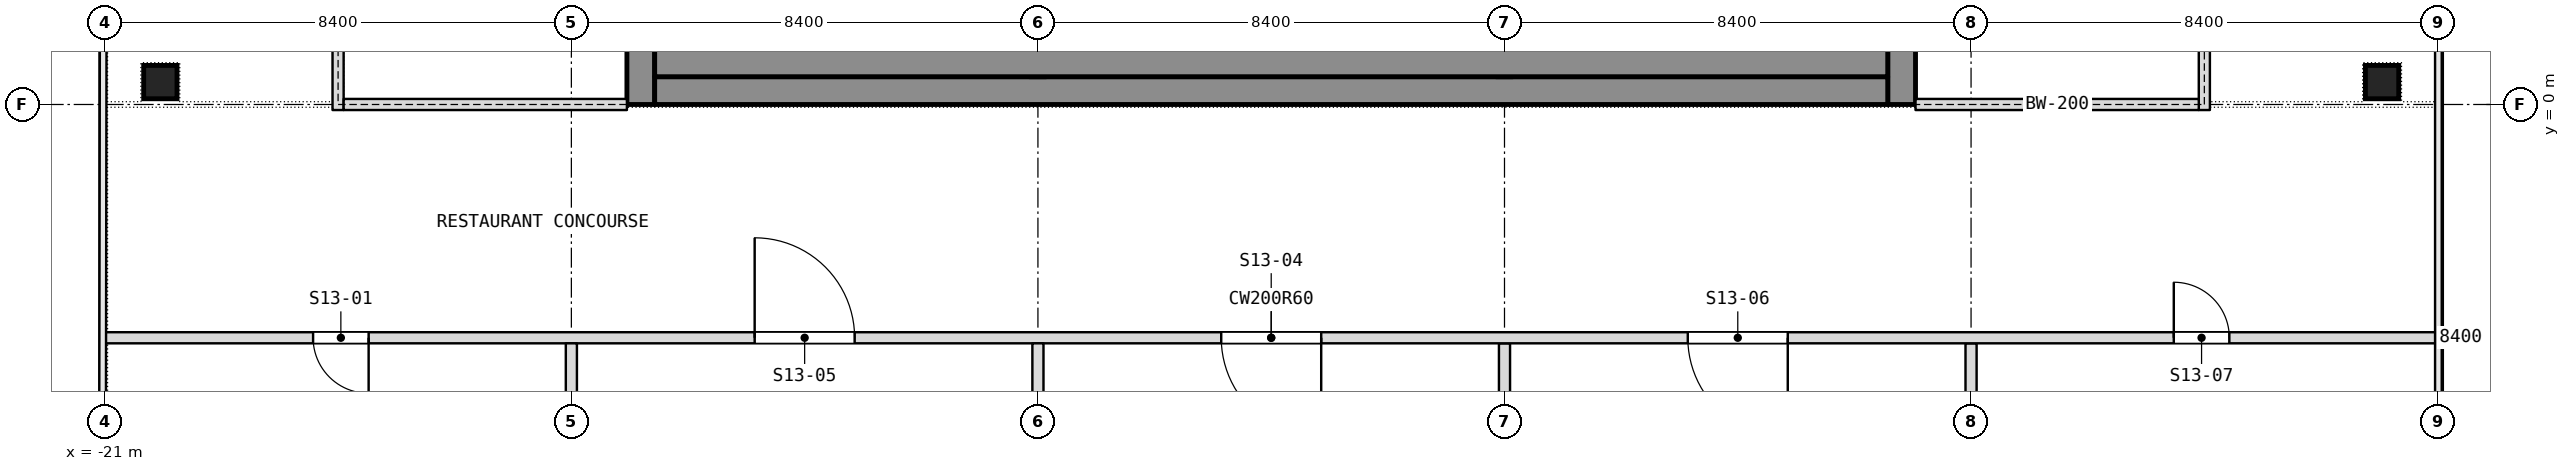
"""IFC4 building model, lengths in metres.
Left out: names, types, materials, properties, quantities, classifications, styles, units other than length and angle.
Written with IfcOpenShell. Run it as: python <this file> out.ifc"""

import sys

from ifc_helpers import new_model, si_unit, direction, frame, frame_2d, origin, origin_2d, place, context, subcontext, project, spatial, rectangle, extrude, element, fill, save


model = new_model("IFC4")
c1 = context("Model", 3, precision=1e-05, world=origin(), true_north=direction((0.0, 1.0)))
c2 = subcontext(c1, "Body", "Model", "MODEL_VIEW")
j1 = project(units=[si_unit("LENGTHUNIT", "METRE"), si_unit("PLANEANGLEUNIT", "RADIAN")], contexts=[c1])
p1 = place(None, origin())
s1 = spatial("IfcSite", under=j1, at=p1, CompositionType="ELEMENT")
p2 = place(p1, origin())
s2 = spatial("IfcBuilding", under=s1, at=p2, CompositionType="ELEMENT")
p3 = place(p2, frame((0.0, 0.0, 288.5)))
s3 = spatial("IfcBuildingStorey", under=s2, at=p3, CompositionType="ELEMENT", Elevation=288.5)
p4 = place(p3, frame((11.35, 0.0, 0.0), z_axis=(0.0, 0.0, 1.0), x_axis=(0.0, 1.0, 0.0)))
e1 = element("IfcWall", 1, at=p4, inside=s3, PredefinedType="SHEAR", context=c2, shape_type="SweptSolid", body=[
    extrude(rectangle(XDim=16.8, YDim=0.5, at=frame_2d((8.4, 0.0))), origin(), (0.0, 0.0, 1.0), 7.2),
])
p5 = place(p4, frame((1.688, 0.0, 0.0)))
e2 = element("IfcOpeningElement", 2, at=p5, cuts=e1, PredefinedType="OPENING", context=c2, shape_type="SweptSolid", body=[
    extrude(rectangle(XDim=0.9, YDim=2.1, at=frame_2d((0.45, 1.05))), frame((0.0, 0.25, 0.0), z_axis=(0.0, -1.0, 0.0), x_axis=(1.0, 0.0, 0.0)), (0.0, 0.0, 1.0), 0.5),
])
p6 = place(p4, frame((4.312, 0.0, 0.0)))
e3 = element("IfcOpeningElement", 3, at=p6, cuts=e1, PredefinedType="OPENING", context=c2, shape_type="SweptSolid", body=[
    extrude(rectangle(XDim=0.9, YDim=2.1, at=frame_2d((0.45, 1.05))), frame((0.0, 0.25, 0.0), z_axis=(0.0, -1.0, 0.0), x_axis=(1.0, 0.0, 0.0)), (0.0, 0.0, 1.0), 0.5),
])
p7 = place(p4, frame((6.825, 0.0, 0.0)))
e4 = element("IfcOpeningElement", 4, at=p7, cuts=e1, PredefinedType="OPENING", context=c2, shape_type="SweptSolid", body=[
    extrude(rectangle(XDim=1.2, YDim=2.1, at=frame_2d((0.6, 1.05))), frame((0.0, 0.25, 0.0), z_axis=(0.0, -1.0, 0.0), x_axis=(1.0, 0.0, 0.0)), (0.0, 0.0, 1.0), 0.5),
])
p8 = place(p4, frame((14.212, 0.0, 0.0)))
e5 = element("IfcOpeningElement", 5, at=p8, cuts=e1, PredefinedType="OPENING", context=c2, shape_type="SweptSolid", body=[
    extrude(rectangle(XDim=0.9, YDim=2.1, at=frame_2d((0.45, 1.05))), frame((0.0, 0.25, 0.0), z_axis=(0.0, -1.0, 0.0), x_axis=(1.0, 0.0, 0.0)), (0.0, 0.0, 1.0), 0.5),
])
p9 = place(p4, frame((11.587, 0.0, 0.0)))
e6 = element("IfcOpeningElement", 6, at=p9, cuts=e1, PredefinedType="OPENING", context=c2, shape_type="SweptSolid", body=[
    extrude(rectangle(XDim=0.9, YDim=2.1, at=frame_2d((0.45, 1.05))), frame((0.0, 0.25, 0.0), z_axis=(0.0, -1.0, 0.0), x_axis=(1.0, 0.0, 0.0)), (0.0, 0.0, 1.0), 0.5),
])
p10 = place(p4, frame((8.775, 0.0, 0.0)))
e7 = element("IfcOpeningElement", 7, at=p10, cuts=e1, PredefinedType="OPENING", context=c2, shape_type="SweptSolid", body=[
    extrude(rectangle(XDim=1.2, YDim=2.1, at=frame_2d((0.6, 1.05))), frame((0.0, 0.25, 0.0), z_axis=(0.0, -1.0, 0.0), x_axis=(1.0, 0.0, 0.0)), (0.0, 0.0, 1.0), 0.5),
])
p11 = place(p3, frame((-11.35, 0.0, 0.0), z_axis=(0.0, 0.0, 1.0), x_axis=(0.0, 1.0, 0.0)))
e8 = element("IfcWall", 8, at=p11, inside=s3, PredefinedType="SHEAR", context=c2, shape_type="SweptSolid", body=[
    extrude(rectangle(XDim=16.8, YDim=0.5, at=frame_2d((8.4, 0.0))), origin(), (0.0, 0.0, 1.0), 7.2),
])
p12 = place(p11, frame((3.6, 0.0, 0.0)))
e9 = element("IfcOpeningElement", 9, at=p12, cuts=e8, PredefinedType="OPENING", context=c2, shape_type="SweptSolid", body=[
    extrude(rectangle(XDim=0.9, YDim=2.1, at=frame_2d((0.45, 1.05))), frame((0.0, 0.25, 0.0), z_axis=(0.0, -1.0, 0.0), x_axis=(1.0, 0.0, 0.0)), (0.0, 0.0, 1.0), 0.5),
])
p13 = place(p11, frame((6.825, 0.0, 0.0)))
e10 = element("IfcOpeningElement", 10, at=p13, cuts=e8, PredefinedType="OPENING", context=c2, shape_type="SweptSolid", body=[
    extrude(rectangle(XDim=1.2, YDim=2.1, at=frame_2d((0.6, 1.05))), frame((0.0, 0.25, 0.0), z_axis=(0.0, -1.0, 0.0), x_axis=(1.0, 0.0, 0.0)), (0.0, 0.0, 1.0), 0.5),
])
p14 = place(p11, frame((14.212, 0.0, 0.0)))
e11 = element("IfcOpeningElement", 11, at=p14, cuts=e8, PredefinedType="OPENING", context=c2, shape_type="SweptSolid", body=[
    extrude(rectangle(XDim=0.9, YDim=2.1, at=frame_2d((0.45, 1.05))), frame((0.0, 0.25, 0.0), z_axis=(0.0, -1.0, 0.0), x_axis=(1.0, 0.0, 0.0)), (0.0, 0.0, 1.0), 0.5),
])
p15 = place(p11, frame((11.587, 0.0, 0.0)))
e12 = element("IfcOpeningElement", 12, at=p15, cuts=e8, PredefinedType="OPENING", context=c2, shape_type="SweptSolid", body=[
    extrude(rectangle(XDim=0.9, YDim=2.1, at=frame_2d((0.45, 1.05))), frame((0.0, 0.25, 0.0), z_axis=(0.0, -1.0, 0.0), x_axis=(1.0, 0.0, 0.0)), (0.0, 0.0, 1.0), 0.5),
])
p16 = place(p11, frame((8.775, 0.0, 0.0)))
e13 = element("IfcOpeningElement", 13, at=p16, cuts=e8, PredefinedType="OPENING", context=c2, shape_type="SweptSolid", body=[
    extrude(rectangle(XDim=1.2, YDim=2.1, at=frame_2d((0.6, 1.05))), frame((0.0, 0.25, 0.0), z_axis=(0.0, -1.0, 0.0), x_axis=(1.0, 0.0, 0.0)), (0.0, 0.0, 1.0), 0.5),
])
p17 = place(p3, frame((-11.1, 0.25, 0.0), z_axis=(0.0, 0.0, 1.0), x_axis=(1.0, 0.0, 0.0)))
e14 = element("IfcWall", 14, at=p17, inside=s3, PredefinedType="SHEAR", context=c2, shape_type="SweptSolid", body=[
    extrude(rectangle(XDim=22.2, YDim=0.5, at=frame_2d((11.1, 0.0))), origin(), (0.0, 0.0, 1.0), 7.2),
])
p18 = place(p3, frame((-4.2, 0.5, 0.0), z_axis=(0.0, 0.0, 1.0), x_axis=(0.0, 1.0, 0.0)))
e15 = element("IfcWall", 15, at=p18, inside=s3, PredefinedType="SHEAR", context=c2, shape_type="SweptSolid", body=[
    extrude(rectangle(XDim=15.8, YDim=0.3, at=frame_2d((7.9, 0.0))), origin(), (0.0, 0.0, 1.0), 7.2),
])
p19 = place(p18, frame((8.8, 0.0, 0.0)))
e16 = element("IfcOpeningElement", 16, at=p19, cuts=e15, PredefinedType="OPENING", context=c2, shape_type="SweptSolid", body=[
    extrude(rectangle(XDim=1.2, YDim=2.1, at=frame_2d((0.6, 1.05))), frame((0.0, 0.15, 0.0), z_axis=(0.0, -1.0, 0.0), x_axis=(1.0, 0.0, 0.0)), (0.0, 0.0, 1.0), 0.3),
])
p20 = place(p3, frame((4.2, 0.5, 0.0), z_axis=(0.0, 0.0, 1.0), x_axis=(0.0, 1.0, 0.0)))
e17 = element("IfcWall", 17, at=p20, inside=s3, PredefinedType="SHEAR", context=c2, shape_type="SweptSolid", body=[
    extrude(rectangle(XDim=15.8, YDim=0.3, at=frame_2d((7.9, 0.0))), origin(), (0.0, 0.0, 1.0), 7.2),
])
p21 = place(p20, frame((6.25, 0.0, 0.0)))
e18 = element("IfcOpeningElement", 18, at=p21, cuts=e17, PredefinedType="OPENING", context=c2, shape_type="SweptSolid", body=[
    extrude(rectangle(XDim=1.2, YDim=2.1, at=frame_2d((0.6, 1.05))), frame((0.0, 0.15, 0.0), z_axis=(0.0, -1.0, 0.0), x_axis=(1.0, 0.0, 0.0)), (0.0, 0.0, 1.0), 0.3),
])
for number, where, z_axis, x_axis in (
    (19, (-20.0, 0.403, 0.0), (0.0, 0.0, 1.0), (1.0, 0.0, 0.0)),
    (20, (20.0, 0.403, 0.0), (0.0, 0.0, 1.0), (1.0, 0.0, 0.0)),
):
    element("IfcColumn", number, at=place(p3, frame(where, z_axis=z_axis, x_axis=x_axis)), inside=s3, PredefinedType="COLUMN", context=c2, shape_type="SweptSolid", body=[
        extrude(rectangle(XDim=0.6, YDim=0.6, at=origin_2d()), origin(), (0.0, 0.0, 1.0), 6.9),
    ])
p22 = place(p3, frame((12.6, -17.5, 0.0), z_axis=(0.0, 0.0, 1.0), x_axis=(0.0, 1.0, 0.0)))
e21 = element("IfcWall", 21, at=p22, inside=s3, PredefinedType="PARTITIONING", context=c2, shape_type="SweptSolid", body=[
    extrude(rectangle(XDim=13.2, YDim=0.2, at=frame_2d((6.6, 0.0))), origin(), (0.0, 0.0, 1.0), 6.9),
])
p23 = place(p3, frame((4.2, -32.9, 0.0), z_axis=(0.0, 0.0, 1.0), x_axis=(0.0, 1.0, 0.0)))
e22 = element("IfcWall", 22, at=p23, inside=s3, PredefinedType="PARTITIONING", context=c2, shape_type="SweptSolid", body=[
    extrude(rectangle(XDim=28.6, YDim=0.2, at=frame_2d((14.3, 0.0))), origin(), (0.0, 0.0, 1.0), 6.9),
])
p24 = place(p3, frame((-21.0, -4.2, 0.0), z_axis=(0.0, 0.0, 1.0), x_axis=(1.0, 0.0, 0.0)))
e23 = element("IfcWall", 23, at=p24, inside=s3, PredefinedType="PARTITIONING", context=c2, shape_type="SweptSolid", body=[
    extrude(rectangle(XDim=42.0, YDim=0.2, at=frame_2d((21.0, 0.0))), origin(), (0.0, 0.0, 1.0), 6.9),
])
p25 = place(p24, frame((3.75, 0.0, 0.0)))
e24 = element("IfcOpeningElement", 24, at=p25, cuts=e23, PredefinedType="OPENING", context=c2, shape_type="SweptSolid", body=[
    extrude(rectangle(XDim=1.0, YDim=2.1, at=frame_2d((0.5, 1.05))), frame((0.0, 0.1, 0.0), z_axis=(0.0, -1.0, 0.0), x_axis=(1.0, 0.0, 0.0)), (0.0, 0.0, 1.0), 0.2),
])
p26 = place(p24, frame((20.1, 0.0, 0.0)))
e25 = element("IfcOpeningElement", 25, at=p26, cuts=e23, PredefinedType="OPENING", context=c2, shape_type="SweptSolid", body=[
    extrude(rectangle(XDim=1.8, YDim=2.1, at=frame_2d((0.9, 1.05))), frame((0.0, 0.1, 0.0), z_axis=(0.0, -1.0, 0.0), x_axis=(1.0, 0.0, 0.0)), (0.0, 0.0, 1.0), 0.2),
])
p27 = place(p24, frame((11.7, 0.0, 0.0)))
e26 = element("IfcOpeningElement", 26, at=p27, cuts=e23, PredefinedType="OPENING", context=c2, shape_type="SweptSolid", body=[
    extrude(rectangle(XDim=1.8, YDim=2.1, at=frame_2d((0.9, 1.05))), frame((0.0, 0.1, 0.0), z_axis=(0.0, -1.0, 0.0), x_axis=(1.0, 0.0, 0.0)), (0.0, 0.0, 1.0), 0.2),
])
p28 = place(p24, frame((28.5, 0.0, 0.0)))
e27 = element("IfcOpeningElement", 27, at=p28, cuts=e23, PredefinedType="OPENING", context=c2, shape_type="SweptSolid", body=[
    extrude(rectangle(XDim=1.8, YDim=2.1, at=frame_2d((0.9, 1.05))), frame((0.0, 0.1, 0.0), z_axis=(0.0, -1.0, 0.0), x_axis=(1.0, 0.0, 0.0)), (0.0, 0.0, 1.0), 0.2),
])
p29 = place(p24, frame((37.25, 0.0, 0.0)))
e28 = element("IfcOpeningElement", 28, at=p29, cuts=e23, PredefinedType="OPENING", context=c2, shape_type="SweptSolid", body=[
    extrude(rectangle(XDim=1.0, YDim=2.1, at=frame_2d((0.5, 1.05))), frame((0.0, 0.1, 0.0), z_axis=(0.0, -1.0, 0.0), x_axis=(1.0, 0.0, 0.0)), (0.0, 0.0, 1.0), 0.2),
])
p30 = place(p3, frame((-4.2, -8.08, 0.0), z_axis=(0.0, 0.0, 1.0), x_axis=(0.0, 1.0, 0.0)))
e29 = element("IfcWall", 29, at=p30, inside=s3, PredefinedType="PARTITIONING", context=c2, shape_type="SweptSolid", body=[
    extrude(rectangle(XDim=3.78, YDim=0.2, at=frame_2d((1.89, 0.0))), origin(), (0.0, 0.0, 1.0), 6.9),
])
p31 = place(p3, frame((-12.6, -10.1, 0.0), z_axis=(0.0, 0.0, 1.0), x_axis=(0.0, 1.0, 0.0)))
e30 = element("IfcWall", 30, at=p31, inside=s3, PredefinedType="PARTITIONING", context=c2, shape_type="SweptSolid", body=[
    extrude(rectangle(XDim=5.8, YDim=0.2, at=frame_2d((2.9, 0.0))), origin(), (0.0, 0.0, 1.0), 6.9),
])
p32 = place(p3, frame((-11.1, 1.0, 0.0), z_axis=(0.0, 0.0, 1.0), x_axis=(1.0, 0.0, 0.0)))
e31 = element("IfcWall", 31, at=p32, inside=s3, PredefinedType="PARTITIONING", context=c2, shape_type="SweptSolid", body=[
    extrude(rectangle(XDim=22.2, YDim=1.0, at=frame_2d((11.1, 0.0))), origin(), (0.0, 0.0, 1.0), 6.9),
])
p33 = place(p3, frame((-16.8, -0.1, 0.0), z_axis=(0.0, 0.0, 1.0), x_axis=(0.0, 1.0, 0.0)))
e32 = element("IfcWall", 32, at=p33, inside=s3, PredefinedType="PARTITIONING", context=c2, shape_type="SweptSolid", body=[
    extrude(rectangle(XDim=17.0, YDim=0.2, at=frame_2d((8.5, 0.0))), origin(), (0.0, 0.0, 1.0), 6.9),
])
p34 = place(p33, frame((1.9, 0.0, 0.0)))
e33 = element("IfcOpeningElement", 33, at=p34, cuts=e32, PredefinedType="OPENING", context=c2, shape_type="SweptSolid", body=[
    extrude(rectangle(XDim=2.4, YDim=2.1, at=frame_2d((1.2, 1.05))), frame((0.0, 0.1, 0.0), z_axis=(0.0, -1.0, 0.0), x_axis=(1.0, 0.0, 0.0)), (0.0, 0.0, 1.0), 0.2),
])
p35 = place(p33, frame((10.3, 0.0, 0.0)))
e34 = element("IfcOpeningElement", 34, at=p35, cuts=e32, PredefinedType="OPENING", context=c2, shape_type="SweptSolid", body=[
    extrude(rectangle(XDim=2.4, YDim=2.1, at=frame_2d((1.2, 1.05))), frame((0.0, 0.1, 0.0), z_axis=(0.0, -1.0, 0.0), x_axis=(1.0, 0.0, 0.0)), (0.0, 0.0, 1.0), 0.2),
])
p36 = place(p3, frame((-16.7, 0.0, 0.0), z_axis=(0.0, 0.0, 1.0), x_axis=(1.0, 0.0, 0.0)))
e35 = element("IfcWall", 35, at=p36, inside=s3, PredefinedType="PARTITIONING", context=c2, shape_type="SweptSolid", body=[
    extrude(rectangle(XDim=5.1, YDim=0.2, at=frame_2d((2.55, 0.0))), origin(), (0.0, 0.0, 1.0), 6.56),
])
p37 = place(p3, frame((16.8, -0.1, 0.0), z_axis=(0.0, 0.0, 1.0), x_axis=(0.0, 1.0, 0.0)))
e36 = element("IfcWall", 36, at=p37, inside=s3, PredefinedType="PARTITIONING", context=c2, shape_type="SweptSolid", body=[
    extrude(rectangle(XDim=17.0, YDim=0.2, at=frame_2d((8.5, 0.0))), origin(), (0.0, 0.0, 1.0), 6.9),
])
p38 = place(p37, frame((1.9, 0.0, 0.0)))
e37 = element("IfcOpeningElement", 37, at=p38, cuts=e36, PredefinedType="OPENING", context=c2, shape_type="SweptSolid", body=[
    extrude(rectangle(XDim=2.4, YDim=2.1, at=frame_2d((1.2, 1.05))), frame((0.0, 0.1, 0.0), z_axis=(0.0, -1.0, 0.0), x_axis=(1.0, 0.0, 0.0)), (0.0, 0.0, 1.0), 0.2),
])
p39 = place(p37, frame((10.3, 0.0, 0.0)))
e38 = element("IfcOpeningElement", 38, at=p39, cuts=e36, PredefinedType="OPENING", context=c2, shape_type="SweptSolid", body=[
    extrude(rectangle(XDim=2.4, YDim=2.1, at=frame_2d((1.2, 1.05))), frame((0.0, 0.1, 0.0), z_axis=(0.0, -1.0, 0.0), x_axis=(1.0, 0.0, 0.0)), (0.0, 0.0, 1.0), 0.2),
])
p40 = place(p3, frame((11.6, 0.0, 0.0), z_axis=(0.0, 0.0, 1.0), x_axis=(1.0, 0.0, 0.0)))
e39 = element("IfcWall", 39, at=p40, inside=s3, PredefinedType="PARTITIONING", context=c2, shape_type="SweptSolid", body=[
    extrude(rectangle(XDim=5.1, YDim=0.2, at=frame_2d((2.55, 0.0))), origin(), (0.0, 0.0, 1.0), 6.56),
])
p41 = place(p25, origin())
e40 = element("IfcDoor", 40, at=p41, inside=s3, OperationType="SINGLE_SWING_LEFT", PredefinedType="DOOR", context=c2, shape_type="SweptSolid", body=[
    extrude(rectangle(XDim=1.0, YDim=2.1, at=frame_2d((0.5, 1.05))), frame((0.0, 0.025, 0.0), z_axis=(0.0, -1.0, 0.0), x_axis=(1.0, 0.0, 0.0)), (0.0, 0.0, 1.0), 0.05),
])
fill(e24, e40)
p42 = place(p26, origin())
e41 = element("IfcDoor", 41, at=p42, inside=s3, OperationType="DOUBLE_DOOR_SINGLE_SWING", PredefinedType="DOOR", context=c2, shape_type="SweptSolid", body=[
    extrude(rectangle(XDim=1.8, YDim=2.1, at=frame_2d((0.9, 1.05))), frame((0.0, 0.025, 0.0), z_axis=(0.0, -1.0, 0.0), x_axis=(1.0, 0.0, 0.0)), (0.0, 0.0, 1.0), 0.05),
])
fill(e25, e41)
p43 = place(p27, origin())
e42 = element("IfcDoor", 42, at=p43, inside=s3, OperationType="DOUBLE_DOOR_SINGLE_SWING", PredefinedType="DOOR", context=c2, shape_type="SweptSolid", body=[
    extrude(rectangle(XDim=1.8, YDim=2.1, at=frame_2d((0.9, 1.05))), frame((0.0, 0.025, 0.0), z_axis=(0.0, -1.0, 0.0), x_axis=(1.0, 0.0, 0.0)), (0.0, 0.0, 1.0), 0.05),
])
fill(e26, e42)
p44 = place(p28, origin())
e43 = element("IfcDoor", 43, at=p44, inside=s3, OperationType="DOUBLE_DOOR_SINGLE_SWING", PredefinedType="DOOR", context=c2, shape_type="SweptSolid", body=[
    extrude(rectangle(XDim=1.8, YDim=2.1, at=frame_2d((0.9, 1.05))), frame((0.0, 0.025, 0.0), z_axis=(0.0, -1.0, 0.0), x_axis=(1.0, 0.0, 0.0)), (0.0, 0.0, 1.0), 0.05),
])
fill(e27, e43)
p45 = place(p29, origin())
e44 = element("IfcDoor", 44, at=p45, inside=s3, OperationType="SINGLE_SWING_LEFT", PredefinedType="DOOR", context=c2, shape_type="SweptSolid", body=[
    extrude(rectangle(XDim=1.0, YDim=2.1, at=frame_2d((0.5, 1.05))), frame((0.0, 0.025, 0.0), z_axis=(0.0, -1.0, 0.0), x_axis=(1.0, 0.0, 0.0)), (0.0, 0.0, 1.0), 0.05),
])
fill(e28, e44)
save(model, sys.argv[1])
